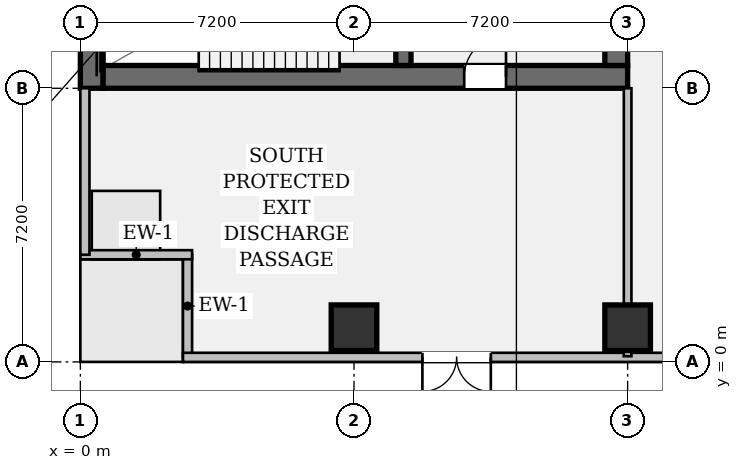
"""IFC4 building model, lengths in metres.
Left out: names, types, materials, properties, quantities, classifications, styles, units other than length and angle.
Written with IfcOpenShell. Run it as: python <this file> out.ifc"""

import sys

from ifc_helpers import new_model, si_unit, direction, frame, frame_2d, origin, origin_2d, place, context, subcontext, project, spatial, rectangle, hollow_rectangle, extrude, element, fill, save


model = new_model("IFC4")
c1 = context("Model", 3, precision=1e-05, world=origin(), true_north=direction((0.0, 1.0)))
c2 = subcontext(c1, "Body", "Model", "MODEL_VIEW")
j1 = project(units=[si_unit("LENGTHUNIT", "METRE"), si_unit("PLANEANGLEUNIT", "RADIAN")], contexts=[c1])
p1 = place(None, origin())
s1 = spatial("IfcSite", under=j1, at=p1, CompositionType="ELEMENT")
p2 = place(p1, origin())
s2 = spatial("IfcBuilding", under=s1, at=p2, CompositionType="ELEMENT")
p3 = place(p2, origin())
s3 = spatial("IfcBuildingStorey", under=s2, at=p3, CompositionType="ELEMENT", Elevation=0.0)
p4 = place(p3, frame((0.3, 7.2, 0.0), z_axis=(0.0, 0.0, 1.0), x_axis=(0.0, 1.0, 0.0)))
e1 = element("IfcWall", 1, at=p4, inside=s3, PredefinedType="SHEAR", context=c2, shape_type="SweptSolid", body=[
    extrude(rectangle(XDim=28.8, YDim=0.6, at=frame_2d((14.4, 0.0))), origin(), (0.0, 0.0, 1.0), 4.95),
])
p5 = place(p3, frame((0.6, 7.5, 0.0), z_axis=(0.0, 0.0, 1.0), x_axis=(1.0, 0.0, 0.0)))
e2 = element("IfcWall", 2, at=p5, inside=s3, PredefinedType="SHEAR", context=c2, shape_type="SweptSolid", body=[
    extrude(rectangle(XDim=13.8, YDim=0.6, at=frame_2d((6.9, 0.0))), origin(), (0.0, 0.0, 1.0), 4.95),
])
p6 = place(p5, frame((9.5, 0.0, 0.0)))
e3 = element("IfcOpeningElement", 3, at=p6, cuts=e2, PredefinedType="OPENING", context=c2, shape_type="SweptSolid", body=[
    extrude(rectangle(XDim=1.1, YDim=2.15, at=frame_2d((0.55, 1.075))), frame((0.0, 0.312, 0.0), z_axis=(0.0, -1.0, 0.0), x_axis=(1.0, 0.0, 0.0)), (0.0, 0.0, 1.0), 0.624),
])
p7 = place(p3, frame((14.1, 35.4, 0.0), z_axis=(0.0, 0.0, 1.0), x_axis=(0.0, -1.0, 0.0)))
e4 = element("IfcWall", 4, at=p7, inside=s3, PredefinedType="SHEAR", context=c2, shape_type="SweptSolid", body=[
    extrude(rectangle(XDim=27.6, YDim=0.6, at=frame_2d((13.8, 0.0))), origin(), (0.0, 0.0, 1.0), 4.95),
])
p8 = place(p7, frame((1.3, 0.0, 0.0)))
e5 = element("IfcOpeningElement", 5, at=p8, cuts=e4, PredefinedType="OPENING", context=c2, shape_type="SweptSolid", body=[
    extrude(rectangle(XDim=1.2, YDim=2.15, at=frame_2d((0.6, 1.075))), frame((0.0, 0.312, 0.0), z_axis=(0.0, -1.0, 0.0), x_axis=(1.0, 0.0, 0.0)), (0.0, 0.0, 1.0), 0.624),
])
p9 = place(p7, frame((25.25, 0.0, 0.0)))
e6 = element("IfcOpeningElement", 6, at=p9, cuts=e4, PredefinedType="OPENING", context=c2, shape_type="SweptSolid", body=[
    extrude(rectangle(XDim=1.2, YDim=2.15, at=frame_2d((0.6, 1.075))), frame((0.0, 0.312, 0.0), z_axis=(0.0, -1.0, 0.0), x_axis=(1.0, 0.0, 0.0)), (0.0, 0.0, 1.0), 0.624),
])
p10 = place(p7, frame((14.6, 0.0, 0.0)))
e7 = element("IfcOpeningElement", 7, at=p10, cuts=e4, PredefinedType="OPENING", context=c2, shape_type="SweptSolid", body=[
    extrude(rectangle(XDim=1.6, YDim=2.2, at=frame_2d((0.8, 1.1))), frame((0.0, 0.312, 0.0), z_axis=(0.0, -1.0, 0.0), x_axis=(1.0, 0.0, 0.0)), (0.0, 0.0, 1.0), 0.624),
])
p11 = place(p3, frame((8.5, 7.8, 0.0), z_axis=(0.0, 0.0, 1.0), x_axis=(0.0, 1.0, 0.0)))
e8 = element("IfcWall", 8, at=p11, inside=s3, PredefinedType="SHEAR", context=c2, shape_type="SweptSolid", body=[
    extrude(rectangle(XDim=3.68, YDim=0.4, at=frame_2d((1.84, 0.0))), origin(), (0.0, 0.0, 1.0), 4.95),
])
p12 = place(p11, frame((0.85, 0.0, 0.0)))
e9 = element("IfcOpeningElement", 9, at=p12, cuts=e8, PredefinedType="OPENING", context=c2, shape_type="SweptSolid", body=[
    extrude(rectangle(XDim=1.1, YDim=2.15, at=frame_2d((0.55, 1.075))), frame((0.0, 0.212, 0.0), z_axis=(0.0, -1.0, 0.0), x_axis=(1.0, 0.0, 0.0)), (0.0, 0.0, 1.0), 0.424),
])
for number, where, z_axis, x_axis in (
    (10, (7.2, 0.9, 0.0), (0.0, 0.0, 1.0), (1.0, 0.0, 0.0)),
    (11, (14.4, 0.9, 0.0), (0.0, 0.0, 1.0), (1.0, 0.0, 0.0)),
):
    element("IfcColumn", number, at=place(p3, frame(where, z_axis=z_axis, x_axis=x_axis)), inside=s3, PredefinedType="COLUMN", context=c2, shape_type="SweptSolid", body=[
        extrude(hollow_rectangle(XDim=1.2, YDim=1.2, WallThickness=0.075, at=origin_2d()), origin(), (0.0, 0.0, 1.0), 4.95),
    ])
p13 = place(p3, frame((2.82, 0.12, 0.0), z_axis=(0.0, 0.0, 1.0), x_axis=(0.0, 1.0, 0.0)))
e12 = element("IfcWall", 12, at=p13, inside=s3, PredefinedType="STANDARD", context=c2, shape_type="SweptSolid", body=[
    extrude(rectangle(XDim=2.7, YDim=0.24, at=frame_2d((1.35, 0.0))), origin(), (0.0, 0.0, 1.0), 4.95),
])
p14 = place(p3, frame((2.94, 2.82, 0.0), z_axis=(0.0, 0.0, 1.0), x_axis=(-1.0, 0.0, 0.0)))
e13 = element("IfcWall", 13, at=p14, inside=s3, PredefinedType="STANDARD", context=c2, shape_type="SweptSolid", body=[
    extrude(rectangle(XDim=2.94, YDim=0.24, at=frame_2d((1.47, 0.0))), origin(), (0.0, 0.0, 1.0), 4.95),
])
p15 = place(p3, frame((0.12, 2.82, 0.0), z_axis=(0.0, 0.0, 1.0), x_axis=(0.0, 1.0, 0.0)))
e14 = element("IfcWall", 14, at=p15, inside=s3, PredefinedType="STANDARD", context=c2, shape_type="SweptSolid", body=[
    extrude(rectangle(XDim=4.38, YDim=0.24, at=frame_2d((2.19, 0.0))), origin(), (0.0, 0.0, 1.0), 4.95),
])
p16 = place(p3, frame((83.7, 0.12, 0.0), z_axis=(0.0, 0.0, 1.0), x_axis=(-1.0, 0.0, 0.0)))
e15 = element("IfcWall", 15, at=p16, inside=s3, PredefinedType="STANDARD", context=c2, shape_type="SweptSolid", body=[
    extrude(rectangle(XDim=81.0, YDim=0.24, at=frame_2d((40.5, 0.0))), origin(), (0.0, 0.0, 1.0), 4.95),
])
p17 = place(p16, frame((72.9, 0.0, 0.0)))
e16 = element("IfcOpeningElement", 16, at=p17, cuts=e15, PredefinedType="OPENING", context=c2, shape_type="SweptSolid", body=[
    extrude(rectangle(XDim=1.8, YDim=2.2, at=frame_2d((0.9, 1.1))), frame((0.0, 0.132, 0.0), z_axis=(0.0, -1.0, 0.0), x_axis=(1.0, 0.0, 0.0)), (0.0, 0.0, 1.0), 0.264),
])
p18 = place(p16, frame((64.5, 0.0, 0.0)))
e17 = element("IfcOpeningElement", 17, at=p18, cuts=e15, PredefinedType="OPENING", context=c2, shape_type="SweptSolid", body=[
    extrude(rectangle(XDim=1.8, YDim=2.2, at=frame_2d((0.9, 1.1))), frame((0.0, 0.132, 0.0), z_axis=(0.0, -1.0, 0.0), x_axis=(1.0, 0.0, 0.0)), (0.0, 0.0, 1.0), 0.264),
])
p19 = place(p16, frame((57.9, 0.0, 0.0)))
e18 = element("IfcOpeningElement", 18, at=p19, cuts=e15, PredefinedType="OPENING", context=c2, shape_type="SweptSolid", body=[
    extrude(rectangle(XDim=1.8, YDim=2.2, at=frame_2d((0.9, 1.1))), frame((0.0, 0.132, 0.0), z_axis=(0.0, -1.0, 0.0), x_axis=(1.0, 0.0, 0.0)), (0.0, 0.0, 1.0), 0.264),
])
p20 = place(p3, frame((14.4, 0.15, 0.0), z_axis=(0.0, 0.0, 1.0), x_axis=(0.0, 1.0, 0.0)))
e19 = element("IfcWall", 19, at=p20, inside=s3, PredefinedType="PARTITIONING", context=c2, shape_type="SweptSolid", body=[
    extrude(rectangle(XDim=7.05, YDim=0.2, at=frame_2d((3.525, 0.0))), origin(), (0.0, 0.0, 1.0), 3.988),
])
p21 = place(p17, origin())
e20 = element("IfcDoor", 20, at=p21, inside=s3, OperationType="DOUBLE_DOOR_SINGLE_SWING", PredefinedType="DOOR", context=c2, shape_type="SweptSolid", body=[
    extrude(rectangle(XDim=1.8, YDim=2.2, at=frame_2d((0.9, 1.1))), frame((0.0, 0.025, 0.0), z_axis=(0.0, -1.0, 0.0), x_axis=(1.0, 0.0, 0.0)), (0.0, 0.0, 1.0), 0.05),
])
fill(e16, e20)
p22 = place(p6, origin())
e21 = element("IfcDoor", 21, at=p22, inside=s3, OperationType="SINGLE_SWING_RIGHT", PredefinedType="DOOR", context=c2, shape_type="SweptSolid", body=[
    extrude(rectangle(XDim=1.1, YDim=2.15, at=frame_2d((0.55, 1.075))), frame((0.0, 0.025, 0.0), z_axis=(0.0, -1.0, 0.0), x_axis=(1.0, 0.0, 0.0)), (0.0, 0.0, 1.0), 0.05),
])
fill(e3, e21)
save(model, sys.argv[1])
